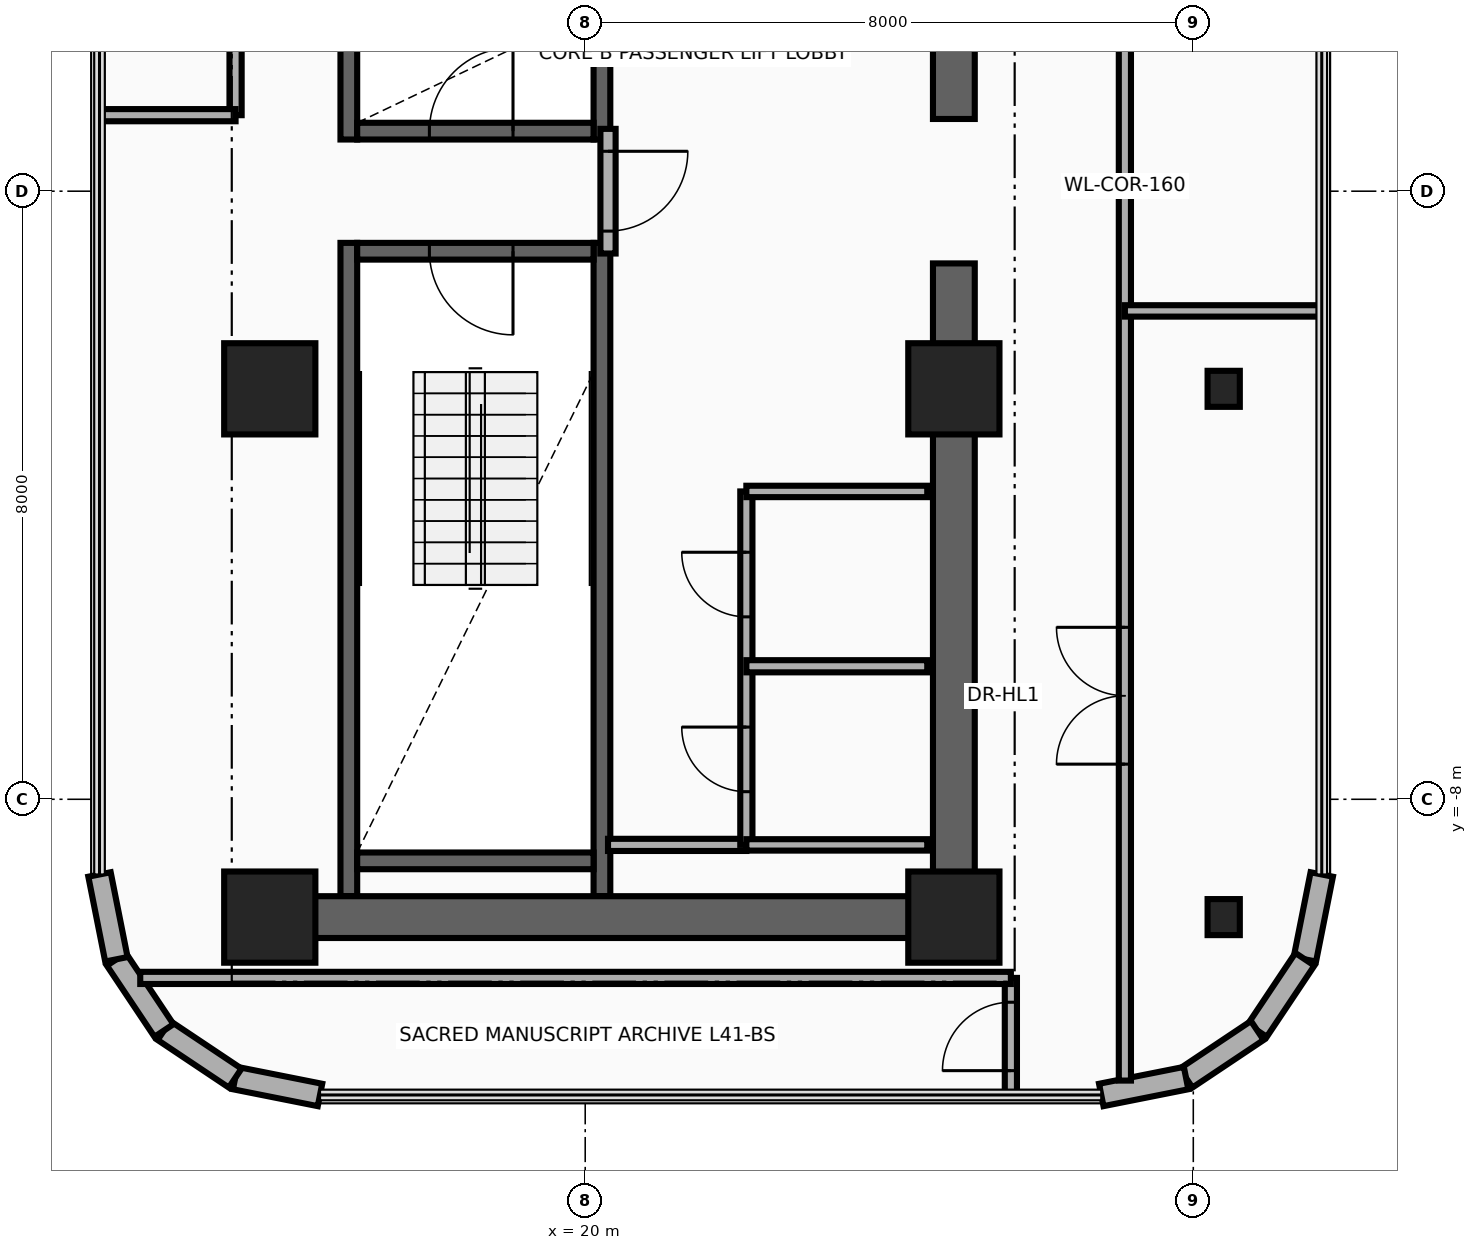
"""IFC4 building model, lengths in metres.
Left out: names, types, materials, properties, quantities, classifications, styles, units other than length and angle.
Written with IfcOpenShell. Run it as: python <this file> out.ifc"""

import sys

from ifc_helpers import new_model, si_unit, direction, frame, frame_2d, origin, origin_2d, place, context, subcontext, project, spatial, rectangle, i_section, extrude, source, transform, mapped, element, fill, save


model = new_model("IFC4")
c1 = context("Model", 3, precision=1e-05, world=origin(), true_north=direction((0.0, 1.0)))
c2 = subcontext(c1, "Body", "Model", "MODEL_VIEW")
j1 = project(units=[si_unit("LENGTHUNIT", "METRE"), si_unit("PLANEANGLEUNIT", "RADIAN")], contexts=[c1])
p1 = place(None, origin())
s1 = spatial("IfcSite", under=j1, at=p1, CompositionType="ELEMENT")
p2 = place(p1, origin())
s2 = spatial("IfcBuilding", under=s1, at=p2, CompositionType="ELEMENT")
p3 = place(p2, frame((0.0, 0.0, 161.2)))
s3 = spatial("IfcBuildingStorey", under=s2, at=p3, CompositionType="ELEMENT", Elevation=161.2)
for number, where, z_axis, x_axis in (
    (1, (16.89, 0.68, 0.0), (0.0, 0.0, 1.0), (0.0, 1.0, 0.0)),
    (2, (20.22, 0.68, 0.0), (0.0, 0.0, 1.0), (0.0, 1.0, 0.0)),
):
    element("IfcWall", number, at=place(p3, frame(where, z_axis=z_axis, x_axis=x_axis)), inside=s3, PredefinedType="SHEAR", context=c2, shape_type="SweptSolid", body=[
        extrude(rectangle(XDim=8.595, YDim=0.22, at=frame_2d((4.297, 0.0))), origin(), (0.0, 0.0, 1.0), 3.46),
    ])
p4 = place(p3, frame((17.0, 0.79, 0.0), z_axis=(0.0, 0.0, 1.0), x_axis=(1.0, 0.0, 0.0)))
e3 = element("IfcWall", 3, at=p4, inside=s3, PredefinedType="SHEAR", context=c2, shape_type="SweptSolid", body=[
    extrude(rectangle(XDim=3.11, YDim=0.22, at=frame_2d((1.555, 0.0))), origin(), (0.0, 0.0, 1.0), 3.46),
])
p5 = place(p4, frame((0.95, 0.0, 0.0)))
e4 = element("IfcOpeningElement", 4, at=p5, cuts=e3, PredefinedType="OPENING", context=c2, shape_type="SweptSolid", body=[
    extrude(rectangle(XDim=1.1, YDim=2.15, at=frame_2d((0.55, 1.075))), frame((0.0, 0.125, 0.0), z_axis=(0.0, -1.0, 0.0), x_axis=(1.0, 0.0, 0.0)), (0.0, 0.0, 1.0), 0.25),
])
for number, where, z_axis, x_axis in (
    (5, (16.89, -9.275, 0.0), (0.0, 0.0, 1.0), (0.0, 1.0, 0.0)),
    (6, (20.22, -9.275, 0.0), (0.0, 0.0, 1.0), (0.0, 1.0, 0.0)),
):
    element("IfcWall", number, at=place(p3, frame(where, z_axis=z_axis, x_axis=x_axis)), inside=s3, PredefinedType="SHEAR", context=c2, shape_type="SweptSolid", body=[
        extrude(rectangle(XDim=8.595, YDim=0.22, at=frame_2d((4.297, 0.0))), origin(), (0.0, 0.0, 1.0), 3.46),
    ])
p6 = place(p3, frame((17.0, -8.81, 0.0), z_axis=(0.0, 0.0, 1.0), x_axis=(1.0, 0.0, 0.0)))
e7 = element("IfcWall", 7, at=p6, inside=s3, PredefinedType="SHEAR", context=c2, shape_type="SweptSolid", body=[
    extrude(rectangle(XDim=3.11, YDim=0.22, at=frame_2d((1.555, 0.0))), origin(), (0.0, 0.0, 1.0), 3.46),
])
p7 = place(p3, frame((17.0, -0.79, 0.0), z_axis=(0.0, 0.0, 1.0), x_axis=(1.0, 0.0, 0.0)))
e8 = element("IfcWall", 8, at=p7, inside=s3, PredefinedType="SHEAR", context=c2, shape_type="SweptSolid", body=[
    extrude(rectangle(XDim=3.11, YDim=0.22, at=frame_2d((1.555, 0.0))), origin(), (0.0, 0.0, 1.0), 3.46),
])
p8 = place(p7, frame((0.95, 0.0, 0.0)))
e9 = element("IfcOpeningElement", 9, at=p8, cuts=e8, PredefinedType="OPENING", context=c2, shape_type="SweptSolid", body=[
    extrude(rectangle(XDim=1.1, YDim=2.15, at=frame_2d((0.55, 1.075))), frame((0.0, 0.125, 0.0), z_axis=(0.0, -1.0, 0.0), x_axis=(1.0, 0.0, 0.0)), (0.0, 0.0, 1.0), 0.25),
])
for number, where, z_axis, x_axis in (
    (10, (24.85, -9.825, 0.0), (0.0, 0.0, 1.0), (0.0, 1.0, 0.0)),
    (11, (24.85, 0.95, 0.0), (0.0, 0.0, 1.0), (0.0, 1.0, 0.0)),
):
    element("IfcWall", number, at=place(p3, frame(where, z_axis=z_axis, x_axis=x_axis)), inside=s3, PredefinedType="SHEAR", context=c2, shape_type="SweptSolid", body=[
        extrude(rectangle(XDim=8.875, YDim=0.55, at=frame_2d((4.438, 0.0))), origin(), (0.0, 0.0, 1.0), 3.46),
    ])
p9 = place(p3, frame((15.85, -9.55, 0.0), z_axis=(0.0, 0.0, 1.0), x_axis=(1.0, 0.0, 0.0)))
e12 = element("IfcWall", 12, at=p9, inside=s3, PredefinedType="SHEAR", context=c2, shape_type="SweptSolid", body=[
    extrude(rectangle(XDim=9.0, YDim=0.55, at=frame_2d((4.5, 0.0))), origin(), (0.0, 0.0, 1.0), 3.46),
])
m1 = source(origin(), c2, "Body", "SweptSolid", [
    extrude(rectangle(XDim=1.2, YDim=1.2, at=origin_2d()), origin(), (0.0, 0.0, 1.0), 3.7),
])
for number, where, z_axis, x_axis in (
    (13, (15.85, -9.55, 0.0), (0.0, 0.0, 1.0), (1.0, 0.0, 0.0)),
    (14, (24.85, -9.55, 0.0), (0.0, 0.0, 1.0), (1.0, 0.0, 0.0)),
):
    element("IfcColumn", number, at=place(p3, frame(where, z_axis=z_axis, x_axis=x_axis)), inside=s3, PredefinedType="COLUMN", context=c2, shape_type="MappedRepresentation", body=[
        mapped(m1, transform((0.0, 0.0, 0.0), x_axis=(1.0, 0.0, 0.0), y_axis=(0.0, 1.0, 0.0), z_axis=(0.0, 0.0, 1.0), scale=1.0)),
    ])
m2 = source(origin(), c2, "Body", "SweptSolid", [
    extrude(i_section(OverallWidth=0.424, OverallDepth=0.474, WebThickness=0.048, FlangeThickness=0.077, at=origin_2d()), origin(), (0.0, 0.0, 1.0), 3.7),
])
p10 = place(p3, frame((28.4, -9.55, 0.0), z_axis=(0.0, 0.0, 1.0), x_axis=(1.0, 0.0, 0.0)))
e15 = element("IfcColumn", 15, at=p10, inside=s3, PredefinedType="COLUMN", context=c2, shape_type="MappedRepresentation", body=[
    mapped(m2, transform((0.0, 0.0, 0.0), x_axis=(1.0, 0.0, 0.0), y_axis=(0.0, 1.0, 0.0), z_axis=(0.0, 0.0, 1.0), scale=1.0)),
])
for number, where, z_axis, x_axis in (
    (16, (15.85, -2.6, 0.0), (0.0, 0.0, 1.0), (1.0, 0.0, 0.0)),
    (17, (24.85, -2.6, 0.0), (0.0, 0.0, 1.0), (1.0, 0.0, 0.0)),
):
    element("IfcColumn", number, at=place(p3, frame(where, z_axis=z_axis, x_axis=x_axis)), inside=s3, PredefinedType="COLUMN", context=c2, shape_type="MappedRepresentation", body=[
        mapped(m1, transform((0.0, 0.0, 0.0), x_axis=(1.0, 0.0, 0.0), y_axis=(0.0, 1.0, 0.0), z_axis=(0.0, 0.0, 1.0), scale=1.0)),
    ])
p11 = place(p3, frame((28.4, -2.6, 0.0), z_axis=(0.0, 0.0, 1.0), x_axis=(1.0, 0.0, 0.0)))
e18 = element("IfcColumn", 18, at=p11, inside=s3, PredefinedType="COLUMN", context=c2, shape_type="MappedRepresentation", body=[
    mapped(m2, transform((0.0, 0.0, 0.0), x_axis=(1.0, 0.0, 0.0), y_axis=(0.0, 1.0, 0.0), z_axis=(0.0, 0.0, 1.0), scale=1.0)),
])
p12 = place(p3, frame((29.69, -8.989, 0.0), z_axis=(0.0, 0.0, 1.0), x_axis=(-0.195043173023, -0.980794657743, 0.0)))
e19 = element("IfcWall", 19, at=p12, inside=s3, PredefinedType="SOLIDWALL", context=c2, shape_type="SweptSolid", body=[
    extrude(rectangle(XDim=1.138, YDim=0.3, at=frame_2d((0.569, 0.0))), origin(), (0.0, 0.0, 1.0), 3.46),
])
for number, where, z_axis, x_axis in (
    (20, (29.468, -10.105, 0.0), (0.0, 0.0, 1.0), (-0.556, -0.831, 0.0)),
    (21, (28.842, -11.042, 0.0), (0.0, 0.0, 1.0), (-0.831, -0.556, 0.0)),
):
    element("IfcWall", number, at=place(p3, frame(where, z_axis=z_axis, x_axis=x_axis)), inside=s3, PredefinedType="SOLIDWALL", context=c2, shape_type="SweptSolid", body=[
        extrude(rectangle(XDim=1.127, YDim=0.3, at=frame_2d((0.563, 0.0))), origin(), (0.0, 0.0, 1.0), 3.46),
    ])
for number, where, z_axis, x_axis in (
    (22, (27.905, -11.668, 0.0), (0.0, 0.0, 1.0), (-0.981, -0.195, 0.0)),
    (23, (16.511, -11.89, 0.0), (0.0, 0.0, 1.0), (-0.981, 0.195, 0.0)),
):
    element("IfcWall", number, at=place(p3, frame(where, z_axis=z_axis, x_axis=x_axis)), inside=s3, PredefinedType="SOLIDWALL", context=c2, shape_type="SweptSolid", body=[
        extrude(rectangle(XDim=1.138, YDim=0.3, at=frame_2d((0.569, 0.0))), origin(), (0.0, 0.0, 1.0), 3.46),
    ])
for number, where, z_axis, x_axis in (
    (24, (15.395, -11.668, 0.0), (0.0, 0.0, 1.0), (-0.831, 0.556, 0.0)),
    (25, (14.458, -11.042, 0.0), (0.0, 0.0, 1.0), (-0.556, 0.831, 0.0)),
):
    element("IfcWall", number, at=place(p3, frame(where, z_axis=z_axis, x_axis=x_axis)), inside=s3, PredefinedType="SOLIDWALL", context=c2, shape_type="SweptSolid", body=[
        extrude(rectangle(XDim=1.127, YDim=0.3, at=frame_2d((0.563, 0.0))), origin(), (0.0, 0.0, 1.0), 3.46),
    ])
p13 = place(p3, frame((13.832, -10.105, 0.0), z_axis=(0.0, 0.0, 1.0), x_axis=(-0.195043173023, 0.980794657743, 0.0)))
e26 = element("IfcWall", 26, at=p13, inside=s3, PredefinedType="SOLIDWALL", context=c2, shape_type="SweptSolid", body=[
    extrude(rectangle(XDim=1.138, YDim=0.3, at=frame_2d((0.569, 0.0))), origin(), (0.0, 0.0, 1.0), 3.46),
])
p14 = place(p3, frame((20.3, -0.82, 0.0), z_axis=(0.0, 0.0, 1.0), x_axis=(0.0, 1.0, 0.0)))
e27 = element("IfcWall", 27, at=p14, inside=s3, PredefinedType="PARTITIONING", context=c2, shape_type="SweptSolid", body=[
    extrude(rectangle(XDim=1.64, YDim=0.2, at=frame_2d((0.82, 0.0))), origin(), (0.0, 0.0, 1.0), 3.46),
])
p15 = place(p14, frame((0.295, 0.0, 0.0)))
e28 = element("IfcOpeningElement", 28, at=p15, cuts=e27, PredefinedType="OPENING", context=c2, shape_type="SweptSolid", body=[
    extrude(rectangle(XDim=1.05, YDim=2.15, at=frame_2d((0.525, 1.075))), frame((0.0, 0.115, 0.0), z_axis=(0.0, -1.0, 0.0), x_axis=(1.0, 0.0, 0.0)), (0.0, 0.0, 1.0), 0.23),
])
p16 = place(p3, frame((20.3, -8.6, 0.0), z_axis=(0.0, 0.0, 1.0), x_axis=(1.0, 0.0, 0.0)))
e29 = element("IfcWall", 29, at=p16, inside=s3, PredefinedType="PARTITIONING", context=c2, shape_type="SweptSolid", body=[
    extrude(rectangle(XDim=1.82, YDim=0.16, at=frame_2d((0.91, 0.0))), origin(), (0.0, 0.0, 1.0), 3.46),
])
p17 = place(p3, frame((22.12, -8.6, 0.0), z_axis=(0.0, 0.0, 1.0), x_axis=(0.0, 1.0, 0.0)))
e30 = element("IfcWall", 30, at=p17, inside=s3, PredefinedType="PARTITIONING", context=c2, shape_type="SweptSolid", body=[
    extrude(rectangle(XDim=4.65, YDim=0.16, at=frame_2d((2.325, 0.0))), origin(), (0.0, 0.0, 1.0), 3.46),
])
p18 = place(p17, frame((0.7, 0.0, 0.0)))
e31 = element("IfcOpeningElement", 31, at=p18, cuts=e30, PredefinedType="OPENING", context=c2, shape_type="SweptSolid", body=[
    extrude(rectangle(XDim=0.85, YDim=2.05, at=frame_2d((0.425, 1.025))), frame((0.0, 0.095, 0.0), z_axis=(0.0, -1.0, 0.0), x_axis=(1.0, 0.0, 0.0)), (0.0, 0.0, 1.0), 0.19),
])
p19 = place(p17, frame((3.0, 0.0, 0.0)))
e32 = element("IfcOpeningElement", 32, at=p19, cuts=e30, PredefinedType="OPENING", context=c2, shape_type="SweptSolid", body=[
    extrude(rectangle(XDim=0.85, YDim=2.05, at=frame_2d((0.425, 1.025))), frame((0.0, 0.095, 0.0), z_axis=(0.0, -1.0, 0.0), x_axis=(1.0, 0.0, 0.0)), (0.0, 0.0, 1.0), 0.19),
])
for number, where, z_axis, x_axis in (
    (33, (22.12, -3.95, 0.0), (0.0, 0.0, 1.0), (1.0, 0.0, 0.0)),
    (34, (22.12, -8.6, 0.0), (0.0, 0.0, 1.0), (1.0, 0.0, 0.0)),
):
    element("IfcWall", number, at=place(p3, frame(where, z_axis=z_axis, x_axis=x_axis)), inside=s3, PredefinedType="PARTITIONING", context=c2, shape_type="SweptSolid", body=[
        extrude(rectangle(XDim=2.38, YDim=0.15, at=frame_2d((1.19, 0.0))), origin(), (0.0, 0.0, 1.0), 3.46),
    ])
p20 = place(p3, frame((22.12, -6.25, 0.0), z_axis=(0.0, 0.0, 1.0), x_axis=(1.0, 0.0, 0.0)))
e35 = element("IfcWall", 35, at=p20, inside=s3, PredefinedType="PARTITIONING", context=c2, shape_type="SweptSolid", body=[
    extrude(rectangle(XDim=2.38, YDim=0.16, at=frame_2d((1.19, 0.0))), origin(), (0.0, 0.0, 1.0), 3.46),
])
p21 = place(p3, frame((25.6, -11.89, 0.0), z_axis=(0.0, 0.0, 1.0), x_axis=(0.0, 1.0, 0.0)))
e36 = element("IfcWall", 36, at=p21, inside=s3, PredefinedType="PARTITIONING", context=c2, shape_type="SweptSolid", body=[
    extrude(rectangle(XDim=1.54, YDim=0.16, at=frame_2d((0.77, 0.0))), origin(), (0.0, 0.0, 1.0), 3.46),
])
p22 = place(p21, frame((0.32, 0.0, 0.0)))
e37 = element("IfcOpeningElement", 37, at=p22, cuts=e36, PredefinedType="OPENING", context=c2, shape_type="SweptSolid", body=[
    extrude(rectangle(XDim=0.9, YDim=2.1, at=frame_2d((0.45, 1.05))), frame((0.0, 0.095, 0.0), z_axis=(0.0, -1.0, 0.0), x_axis=(1.0, 0.0, 0.0)), (0.0, 0.0, 1.0), 0.19),
])
p23 = place(p3, frame((14.146, -10.35, 0.0), z_axis=(0.0, 0.0, 1.0), x_axis=(1.0, 0.0, 0.0)))
e38 = element("IfcWall", 38, at=p23, inside=s3, PredefinedType="PARTITIONING", context=c2, shape_type="SweptSolid", body=[
    extrude(rectangle(XDim=11.454, YDim=0.16, at=frame_2d((5.727, 0.0))), origin(), (0.0, 0.0, 1.0), 3.46),
])
p24 = place(p3, frame((27.1, -11.701, 0.0), z_axis=(0.0, 0.0, 1.0), x_axis=(0.0, 1.0, 0.0)))
e39 = element("IfcWall", 39, at=p24, inside=s3, PredefinedType="PARTITIONING", context=c2, shape_type="SweptSolid", body=[
    extrude(rectangle(XDim=23.551, YDim=0.16, at=frame_2d((11.775, 0.0))), origin(), (0.0, 0.0, 1.0), 2.666),
])
p25 = place(p24, frame((4.163, 0.0, 0.0)))
e40 = element("IfcOpeningElement", 40, at=p25, cuts=e39, PredefinedType="OPENING", context=c2, shape_type="SweptSolid", body=[
    extrude(rectangle(XDim=1.8, YDim=2.15, at=frame_2d((0.9, 1.075))), frame((0.0, 0.095, 0.0), z_axis=(0.0, -1.0, 0.0), x_axis=(1.0, 0.0, 0.0)), (0.0, 0.0, 1.0), 0.19),
])
p26 = place(p24, frame((15.938, 0.0, 0.0)))
e41 = element("IfcOpeningElement", 41, at=p26, cuts=e39, PredefinedType="OPENING", context=c2, shape_type="SweptSolid", body=[
    extrude(rectangle(XDim=1.8, YDim=2.15, at=frame_2d((0.9, 1.075))), frame((0.0, 0.095, 0.0), z_axis=(0.0, -1.0, 0.0), x_axis=(1.0, 0.0, 0.0)), (0.0, 0.0, 1.0), 0.19),
])
p27 = place(p3, frame((27.1, -1.575, 0.0), z_axis=(0.0, 0.0, 1.0), x_axis=(1.0, 0.0, 0.0)))
e42 = element("IfcWall", 42, at=p27, inside=s3, PredefinedType="PARTITIONING", context=c2, shape_type="SweptSolid", body=[
    extrude(rectangle(XDim=2.59, YDim=0.15, at=frame_2d((1.295, 0.0))), origin(), (0.0, 0.0, 1.0), 2.896),
])
p28 = place(p3, frame((15.4, 1.0, 0.0), z_axis=(0.0, 0.0, 1.0), x_axis=(0.0, 1.0, 0.0)))
e43 = element("IfcWall", 43, at=p28, inside=s3, PredefinedType="PARTITIONING", context=c2, shape_type="SweptSolid", body=[
    extrude(rectangle(XDim=9.35, YDim=0.16, at=frame_2d((4.675, 0.0))), origin(), (0.0, 0.0, 1.0), 3.46),
])
p29 = place(p3, frame((13.61, 1.0, 0.0), z_axis=(0.0, 0.0, 1.0), x_axis=(1.0, 0.0, 0.0)))
e44 = element("IfcWall", 44, at=p29, inside=s3, PredefinedType="PARTITIONING", context=c2, shape_type="SweptSolid", body=[
    extrude(rectangle(XDim=1.79, YDim=0.16, at=frame_2d((0.895, 0.0))), origin(), (0.0, 0.0, 1.0), 3.46),
])
p30 = place(p15, frame((1.05, 0.0, 0.0), z_axis=(0.0, 0.0, 1.0), x_axis=(-1.0, 0.0, 0.0)))
e45 = element("IfcDoor", 45, at=p30, inside=s3, OperationType="SINGLE_SWING_LEFT", PredefinedType="DOOR", context=c2, shape_type="SweptSolid", body=[
    extrude(rectangle(XDim=1.05, YDim=2.15, at=frame_2d((0.525, 1.075))), frame((0.0, 0.025, 0.0), z_axis=(0.0, -1.0, 0.0), x_axis=(1.0, 0.0, 0.0)), (0.0, 0.0, 1.0), 0.05),
])
fill(e28, e45)
p31 = place(p5, origin())
e46 = element("IfcDoor", 46, at=p31, inside=s3, OperationType="SINGLE_SWING_RIGHT", PredefinedType="DOOR", context=c2, shape_type="SweptSolid", body=[
    extrude(rectangle(XDim=1.1, YDim=2.15, at=frame_2d((0.55, 1.075))), frame((0.0, 0.025, 0.0), z_axis=(0.0, -1.0, 0.0), x_axis=(1.0, 0.0, 0.0)), (0.0, 0.0, 1.0), 0.05),
])
fill(e4, e46)
p32 = place(p8, frame((1.1, 0.0, 0.0), z_axis=(0.0, 0.0, 1.0), x_axis=(-1.0, 0.0, 0.0)))
e47 = element("IfcDoor", 47, at=p32, inside=s3, OperationType="SINGLE_SWING_LEFT", PredefinedType="DOOR", context=c2, shape_type="SweptSolid", body=[
    extrude(rectangle(XDim=1.1, YDim=2.15, at=frame_2d((0.55, 1.075))), frame((0.0, 0.025, 0.0), z_axis=(0.0, -1.0, 0.0), x_axis=(1.0, 0.0, 0.0)), (0.0, 0.0, 1.0), 0.05),
])
fill(e9, e47)
p33 = place(p18, origin())
e48 = element("IfcDoor", 48, at=p33, inside=s3, OperationType="SINGLE_SWING_LEFT", PredefinedType="DOOR", context=c2, shape_type="SweptSolid", body=[
    extrude(rectangle(XDim=0.85, YDim=2.05, at=frame_2d((0.425, 1.025))), frame((0.0, 0.025, 0.0), z_axis=(0.0, -1.0, 0.0), x_axis=(1.0, 0.0, 0.0)), (0.0, 0.0, 1.0), 0.05),
])
fill(e31, e48)
p34 = place(p19, origin())
e49 = element("IfcDoor", 49, at=p34, inside=s3, OperationType="SINGLE_SWING_RIGHT", PredefinedType="DOOR", context=c2, shape_type="SweptSolid", body=[
    extrude(rectangle(XDim=0.85, YDim=2.05, at=frame_2d((0.425, 1.025))), frame((0.0, 0.025, 0.0), z_axis=(0.0, -1.0, 0.0), x_axis=(1.0, 0.0, 0.0)), (0.0, 0.0, 1.0), 0.05),
])
fill(e32, e49)
p35 = place(p22, origin())
e50 = element("IfcDoor", 50, at=p35, inside=s3, OperationType="SINGLE_SWING_RIGHT", PredefinedType="DOOR", context=c2, shape_type="SweptSolid", body=[
    extrude(rectangle(XDim=0.9, YDim=2.1, at=frame_2d((0.45, 1.05))), frame((0.0, 0.025, 0.0), z_axis=(0.0, -1.0, 0.0), x_axis=(1.0, 0.0, 0.0)), (0.0, 0.0, 1.0), 0.05),
])
fill(e37, e50)
p36 = place(p25, origin())
e51 = element("IfcDoor", 51, at=p36, inside=s3, OperationType="DOUBLE_DOOR_SINGLE_SWING", PredefinedType="DOOR", context=c2, shape_type="SweptSolid", body=[
    extrude(rectangle(XDim=1.8, YDim=2.15, at=frame_2d((0.9, 1.075))), frame((0.0, 0.025, 0.0), z_axis=(0.0, -1.0, 0.0), x_axis=(1.0, 0.0, 0.0)), (0.0, 0.0, 1.0), 0.05),
])
fill(e40, e51)
save(model, sys.argv[1])
